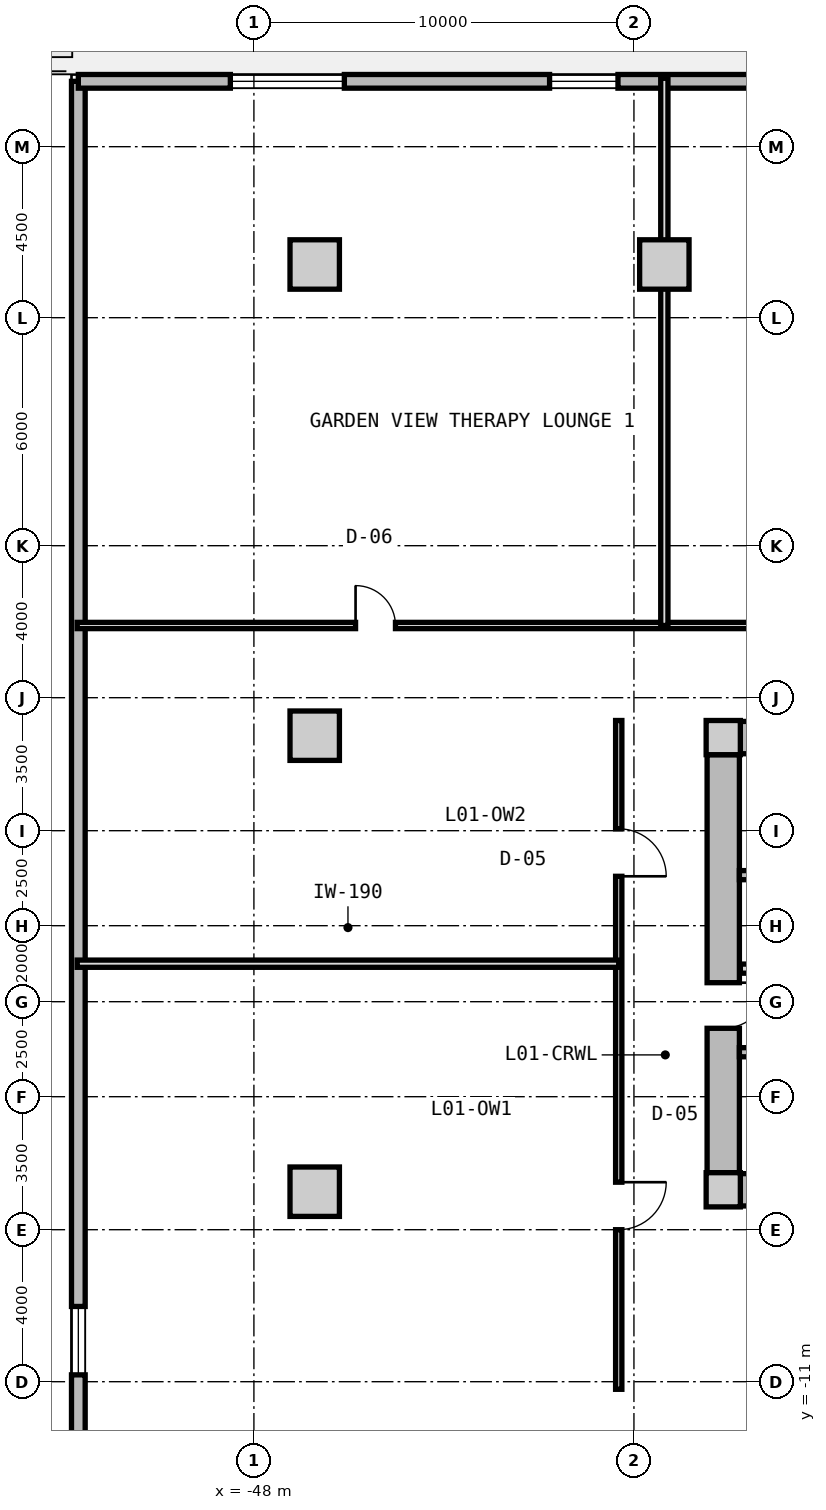
"""IFC4 building model, lengths in metres.
Left out: names, types, materials, properties, quantities, classifications, styles, units other than length and angle.
Written with IfcOpenShell. Run it as: python <this file> out.ifc"""

import sys

from ifc_helpers import new_model, si_unit, direction, frame, frame_2d, origin, origin_2d, place, context, subcontext, project, spatial, rectangle, extrude, source, transform, mapped, element, fill, save


model = new_model("IFC4")
c1 = context("Model", 3, precision=1e-05, world=origin(), true_north=direction((0.0, 1.0)))
c2 = subcontext(c1, "Body", "Model", "MODEL_VIEW")
j1 = project(units=[si_unit("LENGTHUNIT", "METRE"), si_unit("PLANEANGLEUNIT", "RADIAN")], contexts=[c1])
p1 = place(None, origin())
s1 = spatial("IfcSite", under=j1, at=p1, CompositionType="ELEMENT")
p2 = place(p1, origin())
s2 = spatial("IfcBuilding", under=s1, at=p2, CompositionType="ELEMENT")
p3 = place(p2, frame((0.0, 0.0, 4.2)))
s3 = spatial("IfcBuildingStorey", under=s2, at=p3, CompositionType="ELEMENT", Elevation=4.2)
m1 = source(origin(), c2, "Body", "SweptSolid", [
    extrude(rectangle(XDim=0.9, YDim=0.9, at=origin_2d()), origin(), (0.0, 0.0, 1.0), 4.2),
])
for number, where, z_axis, x_axis in (
    (1, (-35.65, -5.95, 0.0), (0.0, 0.0, 1.0), (1.0, 0.0, 0.0)),
    (2, (-35.65, 5.95, 0.0), (0.0, 0.0, 1.0), (1.0, 0.0, 0.0)),
):
    element("IfcColumn", number, at=place(p3, frame(where, z_axis=z_axis, x_axis=x_axis)), inside=s3, PredefinedType="COLUMN", context=c2, shape_type="MappedRepresentation", body=[
        mapped(m1, transform((0.0, 0.0, 0.0), x_axis=(1.0, 0.0, 0.0), y_axis=(0.0, 1.0, 0.0), z_axis=(0.0, 0.0, 1.0), scale=1.0)),
    ])
m2 = source(origin(), c2, "Body", "SweptSolid", [
    extrude(rectangle(XDim=14.4, YDim=0.85, at=frame_2d((7.2, 0.0))), origin(), (0.0, 0.0, 1.0), 3.88),
])
for number, where, z_axis, x_axis in (
    (3, (-35.2, 5.95, 0.0), (0.0, 0.0, 1.0), (1.0, 0.0, 0.0)),
    (4, (-20.8, -5.95, 0.0), (0.0, 0.0, 1.0), (-1.0, 0.0, 0.0)),
):
    element("IfcWall", number, at=place(p3, frame(where, z_axis=z_axis, x_axis=x_axis)), inside=s3, PredefinedType="SHEAR", context=c2, shape_type="MappedRepresentation", body=[
        mapped(m2, transform((0.0, 0.0, 0.0), x_axis=(1.0, 0.0, 0.0), y_axis=(0.0, 1.0, 0.0), z_axis=(0.0, 0.0, 1.0), scale=1.0)),
    ])
m3 = source(origin(), c2, "Body", "SweptSolid", [
    extrude(rectangle(XDim=11.0, YDim=0.85, at=frame_2d((5.5, 0.0))), origin(), (0.0, 0.0, 1.0), 3.88),
])
p4 = place(p3, frame((-35.65, -5.5, 0.0), z_axis=(0.0, 0.0, 1.0), x_axis=(0.0, 1.0, 0.0)))
e5 = element("IfcWall", 5, at=p4, inside=s3, PredefinedType="SHEAR", context=c2, shape_type="MappedRepresentation", body=[
    mapped(m3, transform((0.0, 0.0, 0.0), x_axis=(1.0, 0.0, 0.0), y_axis=(0.0, 1.0, 0.0), z_axis=(0.0, 0.0, 1.0), scale=1.0)),
])
p5 = place(p4, frame((3.8, 0.0, 0.0)))
e6 = element("IfcOpeningElement", 6, at=p5, cuts=e5, PredefinedType="OPENING", context=c2, shape_type="SweptSolid", body=[
    extrude(rectangle(XDim=1.2, YDim=2.15, at=frame_2d((0.6, 1.075))), frame((0.0, 0.435, 0.0), z_axis=(0.0, -1.0, 0.0), x_axis=(1.0, 0.0, 0.0)), (0.0, 0.0, 1.0), 0.87),
])
m4 = source(origin(), c2, "Body", "SweptSolid", [
    extrude(rectangle(XDim=1.3, YDim=1.3, at=origin_2d()), origin(), (0.0, 0.0, 1.0), 4.2),
])
for number, where, z_axis, x_axis in (
    (7, (-46.4, 18.4, 0.0), (0.0, 0.0, 1.0), (1.0, 0.0, 0.0)),
    (8, (-37.2, 18.4, 0.0), (0.0, 0.0, 1.0), (1.0, 0.0, 0.0)),
    (9, (-46.4, -6.0, 0.0), (0.0, 0.0, 1.0), (1.0, 0.0, 0.0)),
    (10, (-46.4, 6.0, 0.0), (0.0, 0.0, 1.0), (1.0, 0.0, 0.0)),
):
    element("IfcColumn", number, at=place(p3, frame(where, z_axis=z_axis, x_axis=x_axis)), inside=s3, PredefinedType="COLUMN", context=c2, shape_type="MappedRepresentation", body=[
        mapped(m4, transform((0.0, 0.0, 0.0), x_axis=(1.0, 0.0, 0.0), y_axis=(0.0, 1.0, 0.0), z_axis=(0.0, 0.0, 1.0), scale=1.0)),
    ])
m5 = source(origin(), c2, "Body", "SweptSolid", [
    extrude(rectangle(XDim=46.44, YDim=0.36, at=frame_2d((23.22, 0.0))), origin(), (0.0, 0.0, 1.0), 3.88),
])
p6 = place(p3, frame((-52.62, -23.22, 0.0), z_axis=(0.0, 0.0, 1.0), x_axis=(0.0, 1.0, 0.0)))
e11 = element("IfcWall", 11, at=p6, inside=s3, PredefinedType="SOLIDWALL", context=c2, shape_type="MappedRepresentation", body=[
    mapped(m5, transform((0.0, 0.0, 0.0), x_axis=(1.0, 0.0, 0.0), y_axis=(0.0, 1.0, 0.0), z_axis=(0.0, 0.0, 1.0), scale=1.0)),
])
p7 = place(p6, frame((4.0, 0.0, 0.85)))
e12 = element("IfcOpeningElement", 12, at=p7, cuts=e11, PredefinedType="OPENING", context=c2, shape_type="SweptSolid", body=[
    extrude(rectangle(XDim=3.0, YDim=2.1, at=frame_2d((1.5, 1.05))), frame((0.0, 0.19, 0.0), z_axis=(0.0, -1.0, 0.0), x_axis=(1.0, 0.0, 0.0)), (0.0, 0.0, 1.0), 0.38),
])
p8 = place(p6, frame((12.4, 0.0, 0.9)))
e13 = element("IfcOpeningElement", 13, at=p8, cuts=e11, PredefinedType="OPENING", context=c2, shape_type="SweptSolid", body=[
    extrude(rectangle(XDim=1.8, YDim=2.0, at=frame_2d((0.9, 1.0))), frame((0.0, 0.19, 0.0), z_axis=(0.0, -1.0, 0.0), x_axis=(1.0, 0.0, 0.0)), (0.0, 0.0, 1.0), 0.38),
])
m6 = source(origin(), c2, "Body", "SweptSolid", [
    extrude(rectangle(XDim=105.24, YDim=0.36, at=frame_2d((52.62, 0.0))), origin(), (0.0, 0.0, 1.0), 3.88),
])
p9 = place(p3, frame((-52.62, 23.22, 0.0), z_axis=(0.0, 0.0, 1.0), x_axis=(1.0, 0.0, 0.0)))
e14 = element("IfcWall", 14, at=p9, inside=s3, PredefinedType="SOLIDWALL", context=c2, shape_type="MappedRepresentation", body=[
    mapped(m6, transform((0.0, 0.0, 0.0), x_axis=(1.0, 0.0, 0.0), y_axis=(0.0, 1.0, 0.0), z_axis=(0.0, 0.0, 1.0), scale=1.0)),
])
p10 = place(p9, frame((49.12, 0.0, 0.0)))
e15 = element("IfcOpeningElement", 15, at=p10, cuts=e14, PredefinedType="OPENING", context=c2, shape_type="SweptSolid", body=[
    extrude(rectangle(XDim=1.15, YDim=2.25, at=frame_2d((0.575, 1.125))), frame((0.0, 0.19, 0.0), z_axis=(0.0, -1.0, 0.0), x_axis=(1.0, 0.0, 0.0)), (0.0, 0.0, 1.0), 0.38),
])
p11 = place(p9, frame((4.0, 0.0, 0.85)))
e16 = element("IfcOpeningElement", 16, at=p11, cuts=e14, PredefinedType="OPENING", context=c2, shape_type="SweptSolid", body=[
    extrude(rectangle(XDim=3.0, YDim=2.1, at=frame_2d((1.5, 1.05))), frame((0.0, 0.19, 0.0), z_axis=(0.0, -1.0, 0.0), x_axis=(1.0, 0.0, 0.0)), (0.0, 0.0, 1.0), 0.38),
])
p12 = place(p9, frame((12.4, 0.0, 0.9)))
e17 = element("IfcOpeningElement", 17, at=p12, cuts=e14, PredefinedType="OPENING", context=c2, shape_type="SweptSolid", body=[
    extrude(rectangle(XDim=1.8, YDim=2.0, at=frame_2d((0.9, 1.0))), frame((0.0, 0.19, 0.0), z_axis=(0.0, -1.0, 0.0), x_axis=(1.0, 0.0, 0.0)), (0.0, 0.0, 1.0), 0.38),
])
p13 = place(p9, frame((20.8, 0.0, 0.85)))
e18 = element("IfcOpeningElement", 18, at=p13, cuts=e14, PredefinedType="OPENING", context=c2, shape_type="SweptSolid", body=[
    extrude(rectangle(XDim=2.4, YDim=2.2, at=frame_2d((1.2, 1.1))), frame((0.0, 0.19, 0.0), z_axis=(0.0, -1.0, 0.0), x_axis=(1.0, 0.0, 0.0)), (0.0, 0.0, 1.0), 0.38),
])
p14 = place(p9, frame((29.2, 0.0, 0.85)))
e19 = element("IfcOpeningElement", 19, at=p14, cuts=e14, PredefinedType="OPENING", context=c2, shape_type="SweptSolid", body=[
    extrude(rectangle(XDim=3.0, YDim=2.1, at=frame_2d((1.5, 1.05))), frame((0.0, 0.19, 0.0), z_axis=(0.0, -1.0, 0.0), x_axis=(1.0, 0.0, 0.0)), (0.0, 0.0, 1.0), 0.38),
])
p15 = place(p9, frame((37.6, 0.0, 0.9)))
e20 = element("IfcOpeningElement", 20, at=p15, cuts=e14, PredefinedType="OPENING", context=c2, shape_type="SweptSolid", body=[
    extrude(rectangle(XDim=1.8, YDim=2.0, at=frame_2d((0.9, 1.0))), frame((0.0, 0.19, 0.0), z_axis=(0.0, -1.0, 0.0), x_axis=(1.0, 0.0, 0.0)), (0.0, 0.0, 1.0), 0.38),
])
p16 = place(p9, frame((62.8, 0.0, 0.9)))
e21 = element("IfcOpeningElement", 21, at=p16, cuts=e14, PredefinedType="OPENING", context=c2, shape_type="SweptSolid", body=[
    extrude(rectangle(XDim=1.8, YDim=2.0, at=frame_2d((0.9, 1.0))), frame((0.0, 0.19, 0.0), z_axis=(0.0, -1.0, 0.0), x_axis=(1.0, 0.0, 0.0)), (0.0, 0.0, 1.0), 0.38),
])
p17 = place(p9, frame((71.2, 0.0, 0.85)))
e22 = element("IfcOpeningElement", 22, at=p17, cuts=e14, PredefinedType="OPENING", context=c2, shape_type="SweptSolid", body=[
    extrude(rectangle(XDim=2.4, YDim=2.2, at=frame_2d((1.2, 1.1))), frame((0.0, 0.19, 0.0), z_axis=(0.0, -1.0, 0.0), x_axis=(1.0, 0.0, 0.0)), (0.0, 0.0, 1.0), 0.38),
])
m7 = source(origin(), c2, "Body", "SweptSolid", [
    extrude(rectangle(XDim=7.765, YDim=0.24, at=frame_2d((3.883, 0.0))), origin(), (0.0, 0.0, 1.0), 3.88),
])
p18 = place(p3, frame((-35.225, 2.33, 0.0), z_axis=(0.0, 0.0, 1.0), x_axis=(1.0, 0.0, 0.0)))
e23 = element("IfcWall", 23, at=p18, inside=s3, PredefinedType="PARTITIONING", context=c2, shape_type="MappedRepresentation", body=[
    mapped(m7, transform((0.0, 0.0, 0.0), x_axis=(1.0, 0.0, 0.0), y_axis=(0.0, 1.0, 0.0), z_axis=(0.0, 0.0, 1.0), scale=1.0)),
])
p19 = place(p3, frame((-35.225, -2.33, 0.0), z_axis=(0.0, 0.0, 1.0), x_axis=(1.0, 0.0, 0.0)))
e24 = element("IfcWall", 24, at=p19, inside=s3, PredefinedType="PARTITIONING", context=c2, shape_type="MappedRepresentation", body=[
    mapped(m7, transform((0.0, 0.0, 0.0), x_axis=(1.0, 0.0, 0.0), y_axis=(0.0, 1.0, 0.0), z_axis=(0.0, 0.0, 1.0), scale=1.0)),
])
p20 = place(p19, frame((0.885, 0.0, 0.0)))
e25 = element("IfcOpeningElement", 25, at=p20, cuts=e24, PredefinedType="OPENING", context=c2, shape_type="SweptSolid", body=[
    extrude(rectangle(XDim=1.1, YDim=2.15, at=frame_2d((0.55, 1.075))), frame((0.0, 0.13, 0.0), z_axis=(0.0, -1.0, 0.0), x_axis=(1.0, 0.0, 0.0)), (0.0, 0.0, 1.0), 0.26),
])
m8 = source(origin(), c2, "Body", "SweptSolid", [
    extrude(rectangle(XDim=7.62, YDim=0.24, at=frame_2d((3.81, 0.0))), origin(), (0.0, 0.0, 1.0), 3.865),
])
p21 = place(p3, frame((-35.2, -0.13, 0.0), z_axis=(0.0, 0.0, 1.0), x_axis=(1.0, 0.0, 0.0)))
e26 = element("IfcWall", 26, at=p21, inside=s3, PredefinedType="PARTITIONING", context=c2, shape_type="MappedRepresentation", body=[
    mapped(m8, transform((0.0, 0.0, 0.0), x_axis=(1.0, 0.0, 0.0), y_axis=(0.0, 1.0, 0.0), z_axis=(0.0, 0.0, 1.0), scale=1.0)),
])
p22 = place(p21, frame((6.22, 0.0, 0.0)))
e27 = element("IfcOpeningElement", 27, at=p22, cuts=e26, PredefinedType="OPENING", context=c2, shape_type="SweptSolid", body=[
    extrude(rectangle(XDim=1.0, YDim=2.1, at=frame_2d((0.5, 1.05))), frame((0.0, 0.13, 0.0), z_axis=(0.0, -1.0, 0.0), x_axis=(1.0, 0.0, 0.0)), (0.0, 0.0, 1.0), 0.26),
])
p23 = place(p21, frame((0.85, 0.0, 0.0)))
e28 = element("IfcOpeningElement", 28, at=p23, cuts=e26, PredefinedType="OPENING", context=c2, shape_type="SweptSolid", body=[
    extrude(rectangle(XDim=1.1, YDim=2.2, at=frame_2d((0.55, 1.1))), frame((0.0, 0.13, 0.0), z_axis=(0.0, -1.0, 0.0), x_axis=(1.0, 0.0, 0.0)), (0.0, 0.0, 1.0), 0.26),
])
p24 = place(p21, frame((3.85, 0.0, 0.0)))
e29 = element("IfcOpeningElement", 29, at=p24, cuts=e26, PredefinedType="OPENING", context=c2, shape_type="SweptSolid", body=[
    extrude(rectangle(XDim=1.1, YDim=2.2, at=frame_2d((0.55, 1.1))), frame((0.0, 0.13, 0.0), z_axis=(0.0, -1.0, 0.0), x_axis=(1.0, 0.0, 0.0)), (0.0, 0.0, 1.0), 0.26),
])
m9 = source(origin(), c2, "Body", "SweptSolid", [
    extrude(rectangle(XDim=17.6, YDim=0.165, at=frame_2d((8.8, 0.0))), origin(), (0.0, 0.0, 1.0), 3.865),
])
p25 = place(p3, frame((-38.4, -11.2, 0.0), z_axis=(0.0, 0.0, 1.0), x_axis=(0.0, 1.0, 0.0)))
e30 = element("IfcWall", 30, at=p25, inside=s3, PredefinedType="PARTITIONING", context=c2, shape_type="MappedRepresentation", body=[
    mapped(m9, transform((0.0, 0.0, 0.0), x_axis=(1.0, 0.0, 0.0), y_axis=(0.0, 1.0, 0.0), z_axis=(0.0, 0.0, 1.0), scale=1.0)),
])
p26 = place(p25, frame((4.2, 0.0, 0.0)))
e31 = element("IfcOpeningElement", 31, at=p26, cuts=e30, PredefinedType="OPENING", context=c2, shape_type="SweptSolid", body=[
    extrude(rectangle(XDim=1.25, YDim=2.2, at=frame_2d((0.625, 1.1))), frame((0.0, 0.093, 0.0), z_axis=(0.0, -1.0, 0.0), x_axis=(1.0, 0.0, 0.0)), (0.0, 0.0, 1.0), 0.185),
])
p27 = place(p25, frame((13.5, 0.0, 0.0)))
e32 = element("IfcOpeningElement", 32, at=p27, cuts=e30, PredefinedType="OPENING", context=c2, shape_type="SweptSolid", body=[
    extrude(rectangle(XDim=1.25, YDim=2.2, at=frame_2d((0.625, 1.1))), frame((0.0, 0.093, 0.0), z_axis=(0.0, -1.0, 0.0), x_axis=(1.0, 0.0, 0.0)), (0.0, 0.0, 1.0), 0.185),
])
m10 = source(origin(), c2, "Body", "SweptSolid", [
    extrude(rectangle(XDim=14.25, YDim=0.19, at=frame_2d((7.125, 0.0))), origin(), (0.0, 0.0, 1.0), 3.865),
])
p28 = place(p3, frame((-52.65, 0.0, 0.0), z_axis=(0.0, 0.0, 1.0), x_axis=(1.0, 0.0, 0.0)))
e33 = element("IfcWall", 33, at=p28, inside=s3, PredefinedType="PARTITIONING", context=c2, shape_type="MappedRepresentation", body=[
    mapped(m10, transform((0.0, 0.0, 0.0), x_axis=(1.0, 0.0, 0.0), y_axis=(0.0, 1.0, 0.0), z_axis=(0.0, 0.0, 1.0), scale=1.0)),
])
m11 = source(origin(), c2, "Body", "SweptSolid", [
    extrude(rectangle(XDim=105.3, YDim=0.165, at=frame_2d((52.65, 0.0))), origin(), (0.0, 0.0, 1.0), 3.865),
])
p29 = place(p3, frame((-52.65, 8.9, 0.0), z_axis=(0.0, 0.0, 1.0), x_axis=(1.0, 0.0, 0.0)))
e34 = element("IfcWall", 34, at=p29, inside=s3, PredefinedType="PARTITIONING", context=c2, shape_type="MappedRepresentation", body=[
    mapped(m11, transform((0.0, 0.0, 0.0), x_axis=(1.0, 0.0, 0.0), y_axis=(0.0, 1.0, 0.0), z_axis=(0.0, 0.0, 1.0), scale=1.0)),
])
p30 = place(p29, frame((7.325, 0.0, 0.0)))
e35 = element("IfcOpeningElement", 35, at=p30, cuts=e34, PredefinedType="OPENING", context=c2, shape_type="SweptSolid", body=[
    extrude(rectangle(XDim=1.05, YDim=2.15, at=frame_2d((0.525, 1.075))), frame((0.0, 0.093, 0.0), z_axis=(0.0, -1.0, 0.0), x_axis=(1.0, 0.0, 0.0)), (0.0, 0.0, 1.0), 0.185),
])
p31 = place(p29, frame((19.525, 0.0, 0.0)))
e36 = element("IfcOpeningElement", 36, at=p31, cuts=e34, PredefinedType="OPENING", context=c2, shape_type="SweptSolid", body=[
    extrude(rectangle(XDim=1.05, YDim=2.15, at=frame_2d((0.525, 1.075))), frame((0.0, 0.093, 0.0), z_axis=(0.0, -1.0, 0.0), x_axis=(1.0, 0.0, 0.0)), (0.0, 0.0, 1.0), 0.185),
])
p32 = place(p29, frame((29.725, 0.0, 0.0)))
e37 = element("IfcOpeningElement", 37, at=p32, cuts=e34, PredefinedType="OPENING", context=c2, shape_type="SweptSolid", body=[
    extrude(rectangle(XDim=1.05, YDim=2.15, at=frame_2d((0.525, 1.075))), frame((0.0, 0.093, 0.0), z_axis=(0.0, -1.0, 0.0), x_axis=(1.0, 0.0, 0.0)), (0.0, 0.0, 1.0), 0.185),
])
p33 = place(p29, frame((40.475, 0.0, 0.0)))
e38 = element("IfcOpeningElement", 38, at=p33, cuts=e34, PredefinedType="OPENING", context=c2, shape_type="SweptSolid", body=[
    extrude(rectangle(XDim=1.05, YDim=2.15, at=frame_2d((0.525, 1.075))), frame((0.0, 0.093, 0.0), z_axis=(0.0, -1.0, 0.0), x_axis=(1.0, 0.0, 0.0)), (0.0, 0.0, 1.0), 0.185),
])
p34 = place(p29, frame((52.125, 0.0, 0.0)))
e39 = element("IfcOpeningElement", 39, at=p34, cuts=e34, PredefinedType="OPENING", context=c2, shape_type="SweptSolid", body=[
    extrude(rectangle(XDim=1.05, YDim=2.15, at=frame_2d((0.525, 1.075))), frame((0.0, 0.093, 0.0), z_axis=(0.0, -1.0, 0.0), x_axis=(1.0, 0.0, 0.0)), (0.0, 0.0, 1.0), 0.185),
])
p35 = place(p29, frame((63.775, 0.0, 0.0)))
e40 = element("IfcOpeningElement", 40, at=p35, cuts=e34, PredefinedType="OPENING", context=c2, shape_type="SweptSolid", body=[
    extrude(rectangle(XDim=1.05, YDim=2.15, at=frame_2d((0.525, 1.075))), frame((0.0, 0.093, 0.0), z_axis=(0.0, -1.0, 0.0), x_axis=(1.0, 0.0, 0.0)), (0.0, 0.0, 1.0), 0.185),
])
p36 = place(p29, frame((74.525, 0.0, 0.0)))
e41 = element("IfcOpeningElement", 41, at=p36, cuts=e34, PredefinedType="OPENING", context=c2, shape_type="SweptSolid", body=[
    extrude(rectangle(XDim=1.05, YDim=2.15, at=frame_2d((0.525, 1.075))), frame((0.0, 0.093, 0.0), z_axis=(0.0, -1.0, 0.0), x_axis=(1.0, 0.0, 0.0)), (0.0, 0.0, 1.0), 0.185),
])
p37 = place(p29, frame((84.725, 0.0, 0.0)))
e42 = element("IfcOpeningElement", 42, at=p37, cuts=e34, PredefinedType="OPENING", context=c2, shape_type="SweptSolid", body=[
    extrude(rectangle(XDim=1.05, YDim=2.15, at=frame_2d((0.525, 1.075))), frame((0.0, 0.093, 0.0), z_axis=(0.0, -1.0, 0.0), x_axis=(1.0, 0.0, 0.0)), (0.0, 0.0, 1.0), 0.185),
])
p38 = place(p29, frame((96.925, 0.0, 0.0)))
e43 = element("IfcOpeningElement", 43, at=p38, cuts=e34, PredefinedType="OPENING", context=c2, shape_type="SweptSolid", body=[
    extrude(rectangle(XDim=1.05, YDim=2.15, at=frame_2d((0.525, 1.075))), frame((0.0, 0.093, 0.0), z_axis=(0.0, -1.0, 0.0), x_axis=(1.0, 0.0, 0.0)), (0.0, 0.0, 1.0), 0.185),
])
m12 = source(origin(), c2, "Body", "SweptSolid", [
    extrude(rectangle(XDim=14.4, YDim=0.19, at=frame_2d((7.2, 0.0))), origin(), (0.0, 0.0, 1.0), 3.865),
])
p39 = place(p3, frame((-37.2, 8.9, 0.0), z_axis=(0.0, 0.0, 1.0), x_axis=(0.0, 1.0, 0.0)))
e44 = element("IfcWall", 44, at=p39, inside=s3, PredefinedType="PARTITIONING", context=c2, shape_type="MappedRepresentation", body=[
    mapped(m12, transform((0.0, 0.0, 0.0), x_axis=(1.0, 0.0, 0.0), y_axis=(0.0, 1.0, 0.0), z_axis=(0.0, 0.0, 1.0), scale=1.0)),
])
m13 = source(origin(), c2, "Body", "SweptSolid", [
    extrude(rectangle(XDim=1.8, YDim=2.0, at=frame_2d((0.9, 1.0))), frame((0.0, 0.03, 0.0), z_axis=(0.0, -1.0, 0.0), x_axis=(1.0, 0.0, 0.0)), (0.0, 0.0, 1.0), 0.06),
])
p40 = place(p8, origin())
e45 = element("IfcWindow", 45, at=p40, inside=s3, PartitioningType="SINGLE_PANEL", PredefinedType="WINDOW", context=c2, shape_type="MappedRepresentation", body=[
    mapped(m13, transform((0.0, 0.0, 0.0), x_axis=(1.0, 0.0, 0.0), y_axis=(0.0, 1.0, 0.0), z_axis=(0.0, 0.0, 1.0), scale=1.0)),
])
fill(e13, e45)
m14 = source(origin(), c2, "Body", "SweptSolid", [
    extrude(rectangle(XDim=3.0, YDim=2.1, at=frame_2d((1.5, 1.05))), frame((0.0, 0.03, 0.0), z_axis=(0.0, -1.0, 0.0), x_axis=(1.0, 0.0, 0.0)), (0.0, 0.0, 1.0), 0.06),
])
p41 = place(p11, origin())
e46 = element("IfcWindow", 46, at=p41, inside=s3, PartitioningType="SINGLE_PANEL", PredefinedType="WINDOW", context=c2, shape_type="MappedRepresentation", body=[
    mapped(m14, transform((0.0, 0.0, 0.0), x_axis=(1.0, 0.0, 0.0), y_axis=(0.0, 1.0, 0.0), z_axis=(0.0, 0.0, 1.0), scale=1.0)),
])
fill(e16, e46)
p42 = place(p12, origin())
e47 = element("IfcWindow", 47, at=p42, inside=s3, PartitioningType="SINGLE_PANEL", PredefinedType="WINDOW", context=c2, shape_type="MappedRepresentation", body=[
    mapped(m13, transform((0.0, 0.0, 0.0), x_axis=(1.0, 0.0, 0.0), y_axis=(0.0, 1.0, 0.0), z_axis=(0.0, 0.0, 1.0), scale=1.0)),
])
fill(e17, e47)
m15 = source(origin(), c2, "Body", "SweptSolid", [
    extrude(rectangle(XDim=1.2, YDim=2.15, at=frame_2d((0.6, 1.075))), frame((0.0, 0.025, 0.0), z_axis=(0.0, -1.0, 0.0), x_axis=(1.0, 0.0, 0.0)), (0.0, 0.0, 1.0), 0.05),
])
p43 = place(p5, frame((1.2, 0.0, 0.0), z_axis=(0.0, 0.0, 1.0), x_axis=(-1.0, 0.0, 0.0)))
e48 = element("IfcDoor", 48, at=p43, inside=s3, OperationType="SINGLE_SWING_LEFT", PredefinedType="DOOR", context=c2, shape_type="MappedRepresentation", body=[
    mapped(m15, transform((0.0, 0.0, 0.0), x_axis=(1.0, 0.0, 0.0), y_axis=(0.0, 1.0, 0.0), z_axis=(0.0, 0.0, 1.0), scale=1.0)),
])
fill(e6, e48)
m16 = source(origin(), c2, "Body", "SweptSolid", [
    extrude(rectangle(XDim=1.25, YDim=2.2, at=frame_2d((0.625, 1.1))), frame((0.0, 0.025, 0.0), z_axis=(0.0, -1.0, 0.0), x_axis=(1.0, 0.0, 0.0)), (0.0, 0.0, 1.0), 0.05),
])
p44 = place(p26, frame((1.25, 0.0, 0.0), z_axis=(0.0, 0.0, 1.0), x_axis=(-1.0, 0.0, 0.0)))
e49 = element("IfcDoor", 49, at=p44, inside=s3, OperationType="SINGLE_SWING_LEFT", PredefinedType="DOOR", context=c2, shape_type="MappedRepresentation", body=[
    mapped(m16, transform((0.0, 0.0, 0.0), x_axis=(1.0, 0.0, 0.0), y_axis=(0.0, 1.0, 0.0), z_axis=(0.0, 0.0, 1.0), scale=1.0)),
])
fill(e31, e49)
p45 = place(p27, frame((1.25, 0.0, 0.0), z_axis=(0.0, 0.0, 1.0), x_axis=(-1.0, 0.0, 0.0)))
e50 = element("IfcDoor", 50, at=p45, inside=s3, OperationType="SINGLE_SWING_RIGHT", PredefinedType="DOOR", context=c2, shape_type="MappedRepresentation", body=[
    mapped(m16, transform((0.0, 0.0, 0.0), x_axis=(1.0, 0.0, 0.0), y_axis=(0.0, 1.0, 0.0), z_axis=(0.0, 0.0, 1.0), scale=1.0)),
])
fill(e32, e50)
m17 = source(origin(), c2, "Body", "SweptSolid", [
    extrude(rectangle(XDim=1.05, YDim=2.15, at=frame_2d((0.525, 1.075))), frame((0.0, 0.025, 0.0), z_axis=(0.0, -1.0, 0.0), x_axis=(1.0, 0.0, 0.0)), (0.0, 0.0, 1.0), 0.05),
])
p46 = place(p30, origin())
e51 = element("IfcDoor", 51, at=p46, inside=s3, OperationType="SINGLE_SWING_LEFT", PredefinedType="DOOR", context=c2, shape_type="MappedRepresentation", body=[
    mapped(m17, transform((0.0, 0.0, 0.0), x_axis=(1.0, 0.0, 0.0), y_axis=(0.0, 1.0, 0.0), z_axis=(0.0, 0.0, 1.0), scale=1.0)),
])
fill(e35, e51)
save(model, sys.argv[1])
